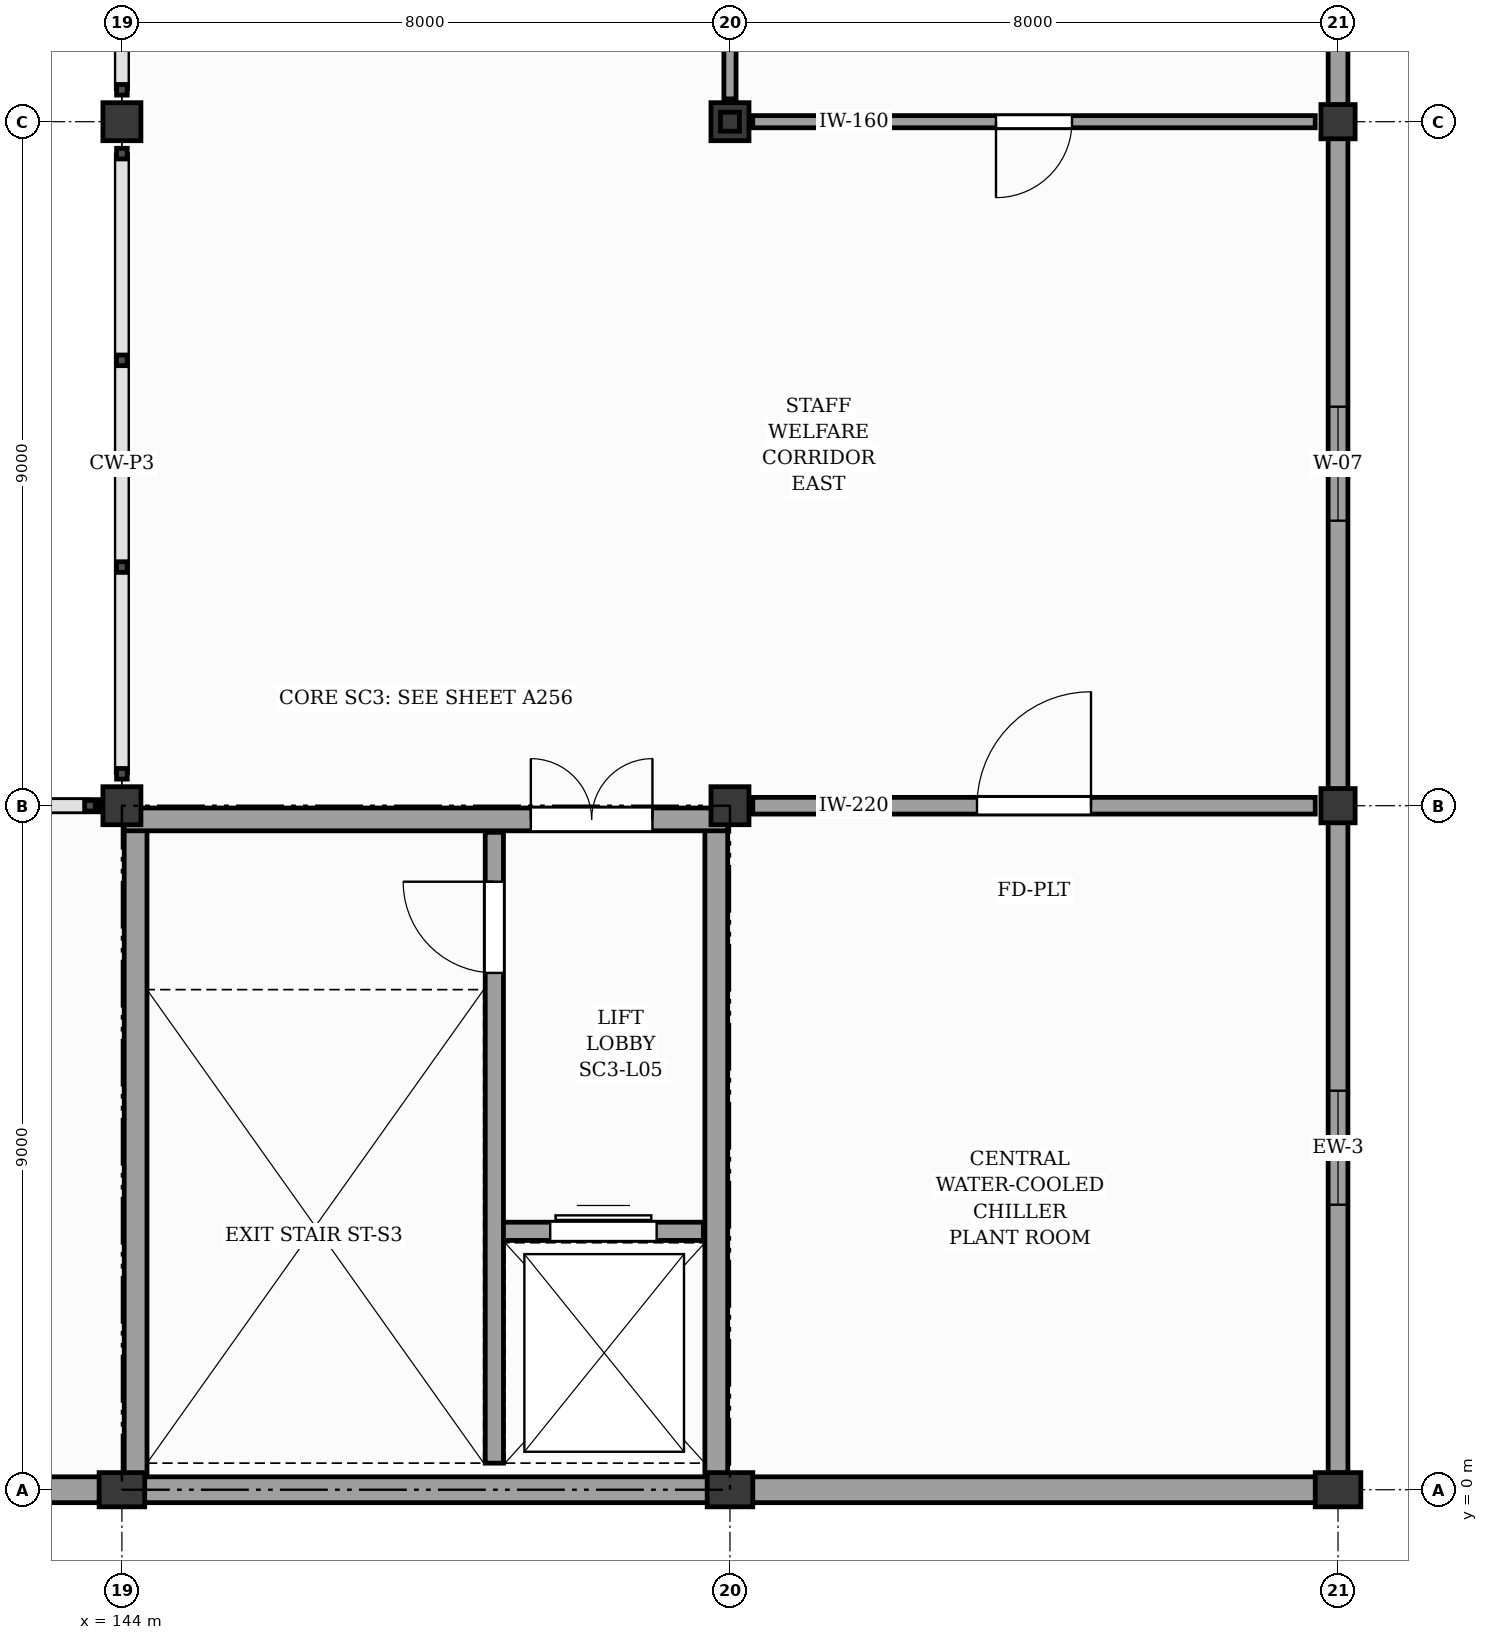
"""IFC4 building model, lengths in metres.
Left out: names, types, materials, properties, quantities, classifications, styles, units other than length and angle.
Written with IfcOpenShell. Run it as: python <this file> out.ifc"""

import sys

from ifc_helpers import new_model, si_unit, direction, frame, frame_2d, origin, origin_2d, place, context, subcontext, project, spatial, rectangle, i_section, extrude, element, fill, save


model = new_model("IFC4")
c1 = context("Model", 3, precision=1e-05, world=origin(), true_north=direction((0.0, 1.0)))
c2 = subcontext(c1, "Body", "Model", "MODEL_VIEW")
j1 = project(units=[si_unit("LENGTHUNIT", "METRE"), si_unit("PLANEANGLEUNIT", "RADIAN")], contexts=[c1])
p1 = place(None, origin())
s1 = spatial("IfcSite", under=j1, at=p1, CompositionType="ELEMENT")
p2 = place(p1, origin())
s2 = spatial("IfcBuilding", under=s1, at=p2, CompositionType="ELEMENT")
p3 = place(p2, frame((0.0, 0.0, 24.6)))
s3 = spatial("IfcBuildingStorey", under=s2, at=p3, CompositionType="ELEMENT", Elevation=24.6)
p4 = place(p3, frame((144.0, 0.0, 0.0), z_axis=(0.0, 0.0, 1.0), x_axis=(1.0, 0.0, 0.0)))
e1 = element("IfcColumn", 1, at=p4, inside=s3, PredefinedType="PILASTER", context=c2, shape_type="SweptSolid", body=[
    extrude(rectangle(XDim=0.6, YDim=0.45, at=origin_2d()), origin(), (0.0, 0.0, 1.0), 4.2),
])
for number, where, z_axis, x_axis in (
    (2, (144.0, 9.0, 0.0), (0.0, 0.0, 1.0), (1.0, 0.0, 0.0)),
    (3, (144.0, 18.0, 0.0), (0.0, 0.0, 1.0), (1.0, 0.0, 0.0)),
):
    element("IfcColumn", number, at=place(p3, frame(where, z_axis=z_axis, x_axis=x_axis)), inside=s3, PredefinedType="COLUMN", context=c2, shape_type="SweptSolid", body=[
        extrude(rectangle(XDim=0.5, YDim=0.5, at=origin_2d()), origin(), (0.0, 0.0, 1.0), 4.2),
    ])
p5 = place(p3, frame((152.0, 0.0, 0.0), z_axis=(0.0, 0.0, 1.0), x_axis=(1.0, 0.0, 0.0)))
e4 = element("IfcColumn", 4, at=p5, inside=s3, PredefinedType="PILASTER", context=c2, shape_type="SweptSolid", body=[
    extrude(rectangle(XDim=0.6, YDim=0.45, at=origin_2d()), origin(), (0.0, 0.0, 1.0), 4.2),
])
for number, where, z_axis, x_axis in (
    (5, (152.0, 9.0, 0.0), (0.0, 0.0, 1.0), (1.0, 0.0, 0.0)),
    (6, (152.0, 18.0, 0.0), (0.0, 0.0, 1.0), (1.0, 0.0, 0.0)),
):
    element("IfcColumn", number, at=place(p3, frame(where, z_axis=z_axis, x_axis=x_axis)), inside=s3, PredefinedType="COLUMN", context=c2, shape_type="SweptSolid", body=[
        extrude(rectangle(XDim=0.5, YDim=0.5, at=origin_2d()), origin(), (0.0, 0.0, 1.0), 4.2),
    ])
p6 = place(p3, frame((160.0, 0.0, 0.0), z_axis=(0.0, 0.0, 1.0), x_axis=(1.0, 0.0, 0.0)))
e7 = element("IfcColumn", 7, at=p6, inside=s3, PredefinedType="PILASTER", context=c2, shape_type="SweptSolid", body=[
    extrude(rectangle(XDim=0.6, YDim=0.45, at=origin_2d()), origin(), (0.0, 0.0, 1.0), 4.2),
])
for number, where, z_axis, x_axis in (
    (8, (160.0, 9.0, 0.0), (0.0, 0.0, 1.0), (1.0, 0.0, 0.0)),
    (9, (160.0, 18.0, 0.0), (0.0, 0.0, 1.0), (1.0, 0.0, 0.0)),
):
    element("IfcColumn", number, at=place(p3, frame(where, z_axis=z_axis, x_axis=x_axis)), inside=s3, PredefinedType="COLUMN", context=c2, shape_type="SweptSolid", body=[
        extrude(rectangle(XDim=0.45, YDim=0.45, at=origin_2d()), origin(), (0.0, 0.0, 1.0), 4.2),
    ])
p7 = place(p3, frame((152.0, 18.0, 4.2), z_axis=(0.0, 0.0, 1.0), x_axis=(1.0, 0.0, 0.0)))
e10 = element("IfcColumn", 10, at=p7, inside=s3, PredefinedType="COLUMN", context=c2, shape_type="SweptSolid", body=[
    extrude(i_section(OverallWidth=0.25, OverallDepth=0.25, WebThickness=0.009, FlangeThickness=0.01, FilletRadius=0.01, at=origin_2d()), origin(), (0.0, 0.0, 1.0), 3.25),
])
for number, where, z_axis, x_axis in (
    (11, (136.295, 0.0, 0.0), (0.0, 0.0, 1.0), (1.0, 0.0, 0.0)),
    (12, (144.295, 0.0, 0.0), (0.0, 0.0, 1.0), (1.0, 0.0, 0.0)),
    (13, (152.295, 0.0, 0.0), (0.0, 0.0, 1.0), (1.0, 0.0, 0.0)),
):
    element("IfcWall", number, at=place(p3, frame(where, z_axis=z_axis, x_axis=x_axis)), inside=s3, PredefinedType="SOLIDWALL", context=c2, shape_type="SweptSolid", body=[
        extrude(rectangle(XDim=7.41, YDim=0.34, at=frame_2d((3.705, 0.0))), origin(), (0.0, 0.0, 1.0), 3.24),
    ])
p8 = place(p3, frame((160.0, 0.22, 0.0), z_axis=(0.0, 0.0, 1.0), x_axis=(0.0, 1.0, 0.0)))
e14 = element("IfcWall", 14, at=p8, inside=s3, PredefinedType="SOLIDWALL", context=c2, shape_type="SweptSolid", body=[
    extrude(rectangle(XDim=8.56, YDim=0.26, at=frame_2d((4.28, 0.0))), origin(), (0.0, 0.0, 1.0), 3.24),
])
p9 = place(p8, frame((3.53, 0.0, 0.95)))
e15 = element("IfcOpeningElement", 15, at=p9, cuts=e14, PredefinedType="OPENING", context=c2, shape_type="SweptSolid", body=[
    extrude(rectangle(XDim=1.5, YDim=1.9, at=frame_2d((0.75, 0.95))), frame((0.0, 0.14, 0.0), z_axis=(0.0, -1.0, 0.0), x_axis=(1.0, 0.0, 0.0)), (0.0, 0.0, 1.0), 0.28),
])
p10 = place(p3, frame((160.0, 9.22, 0.0), z_axis=(0.0, 0.0, 1.0), x_axis=(0.0, 1.0, 0.0)))
e16 = element("IfcWall", 16, at=p10, inside=s3, PredefinedType="SOLIDWALL", context=c2, shape_type="SweptSolid", body=[
    extrude(rectangle(XDim=8.56, YDim=0.26, at=frame_2d((4.28, 0.0))), origin(), (0.0, 0.0, 1.0), 3.24),
])
p11 = place(p10, frame((3.53, 0.0, 0.95)))
e17 = element("IfcOpeningElement", 17, at=p11, cuts=e16, PredefinedType="OPENING", context=c2, shape_type="SweptSolid", body=[
    extrude(rectangle(XDim=1.5, YDim=1.9, at=frame_2d((0.75, 0.95))), frame((0.0, 0.14, 0.0), z_axis=(0.0, -1.0, 0.0), x_axis=(1.0, 0.0, 0.0)), (0.0, 0.0, 1.0), 0.28),
])
p12 = place(p3, frame((160.0, 18.22, 0.0), z_axis=(0.0, 0.0, 1.0), x_axis=(0.0, 1.0, 0.0)))
e18 = element("IfcWall", 18, at=p12, inside=s3, PredefinedType="SOLIDWALL", context=c2, shape_type="SweptSolid", body=[
    extrude(rectangle(XDim=8.56, YDim=0.26, at=frame_2d((4.28, 0.0))), origin(), (0.0, 0.0, 1.0), 3.24),
])
p13 = place(p12, frame((3.53, 0.0, 0.95)))
e19 = element("IfcOpeningElement", 19, at=p13, cuts=e18, PredefinedType="OPENING", context=c2, shape_type="SweptSolid", body=[
    extrude(rectangle(XDim=1.5, YDim=1.9, at=frame_2d((0.75, 0.95))), frame((0.0, 0.14, 0.0), z_axis=(0.0, -1.0, 0.0), x_axis=(1.0, 0.0, 0.0)), (0.0, 0.0, 1.0), 0.28),
])
p14 = place(p3, frame((148.9, 0.35, 0.0), z_axis=(0.0, 0.0, 1.0), x_axis=(0.0, 1.0, 0.0)))
e20 = element("IfcWall", 20, at=p14, inside=s3, PredefinedType="SHEAR", context=c2, shape_type="SweptSolid", body=[
    extrude(rectangle(XDim=8.3, YDim=0.24, at=frame_2d((4.15, 0.0))), origin(), (0.0, 0.0, 1.0), 3.98),
])
p15 = place(p14, frame((6.45, 0.0, 0.0)))
e21 = element("IfcOpeningElement", 21, at=p15, cuts=e20, PredefinedType="OPENING", context=c2, shape_type="SweptSolid", body=[
    extrude(rectangle(XDim=1.2, YDim=2.15, at=frame_2d((0.6, 1.075))), frame((0.0, 0.13, 0.0), z_axis=(0.0, -1.0, 0.0), x_axis=(1.0, 0.0, 0.0)), (0.0, 0.0, 1.0), 0.26),
])
p16 = place(p3, frame((149.02, 3.4, 0.0), z_axis=(0.0, 0.0, 1.0), x_axis=(1.0, 0.0, 0.0)))
e22 = element("IfcWall", 22, at=p16, inside=s3, PredefinedType="SHEAR", context=c2, shape_type="SweptSolid", body=[
    extrude(rectangle(XDim=2.63, YDim=0.24, at=frame_2d((1.315, 0.0))), origin(), (0.0, 0.0, 1.0), 3.98),
])
p17 = place(p16, frame((0.615, 0.0, 0.0)))
e23 = element("IfcOpeningElement", 23, at=p17, cuts=e22, PredefinedType="OPENING", context=c2, shape_type="SweptSolid", body=[
    extrude(rectangle(XDim=1.4, YDim=2.15, at=frame_2d((0.7, 1.075))), frame((0.0, 0.13, 0.0), z_axis=(0.0, -1.0, 0.0), x_axis=(1.0, 0.0, 0.0)), (0.0, 0.0, 1.0), 0.26),
])
for number, where, z_axis, x_axis in (
    (24, (144.18, 0.18, 0.0), (0.0, 0.0, 1.0), (0.0, 1.0, 0.0)),
    (25, (151.82, 0.18, 0.0), (0.0, 0.0, 1.0), (0.0, 1.0, 0.0)),
):
    element("IfcWall", number, at=place(p3, frame(where, z_axis=z_axis, x_axis=x_axis)), inside=s3, PredefinedType="SHEAR", context=c2, shape_type="SweptSolid", body=[
        extrude(rectangle(XDim=8.64, YDim=0.3, at=frame_2d((4.32, 0.0))), origin(), (0.0, 0.0, 1.0), 3.98),
    ])
p18 = place(p3, frame((144.03, 8.82, 0.0), z_axis=(0.0, 0.0, 1.0), x_axis=(1.0, 0.0, 0.0)))
e26 = element("IfcWall", 26, at=p18, inside=s3, PredefinedType="SHEAR", context=c2, shape_type="SweptSolid", body=[
    extrude(rectangle(XDim=7.94, YDim=0.3, at=frame_2d((3.97, 0.0))), origin(), (0.0, 0.0, 1.0), 3.98),
])
p19 = place(p18, frame((5.35, 0.0, 0.0)))
e27 = element("IfcOpeningElement", 27, at=p19, cuts=e26, PredefinedType="OPENING", context=c2, shape_type="SweptSolid", body=[
    extrude(rectangle(XDim=1.6, YDim=2.15, at=frame_2d((0.8, 1.075))), frame((0.0, 0.16, 0.0), z_axis=(0.0, -1.0, 0.0), x_axis=(1.0, 0.0, 0.0)), (0.0, 0.0, 1.0), 0.32),
])
p20 = place(p3, frame((136.3, 9.0, 0.0), z_axis=(0.0, 0.0, 1.0), x_axis=(1.0, 0.0, 0.0)))
e28 = element("IfcWall", 28, at=p20, inside=s3, PredefinedType="PARTITIONING", context=c2, shape_type="SweptSolid", body=[
    extrude(rectangle(XDim=7.4, YDim=0.16, at=frame_2d((3.7, 0.0))), origin(), (0.0, 0.0, 1.0), 3.1),
])
p21 = place(p3, frame((152.3, 18.0, 0.0), z_axis=(0.0, 0.0, 1.0), x_axis=(1.0, 0.0, 0.0)))
e29 = element("IfcWall", 29, at=p21, inside=s3, PredefinedType="PARTITIONING", context=c2, shape_type="SweptSolid", body=[
    extrude(rectangle(XDim=7.4, YDim=0.16, at=frame_2d((3.7, 0.0))), origin(), (0.0, 0.0, 1.0), 3.1),
])
p22 = place(p21, frame((3.2, 0.0, 0.0)))
e30 = element("IfcOpeningElement", 30, at=p22, cuts=e29, PredefinedType="OPENING", context=c2, shape_type="SweptSolid", body=[
    extrude(rectangle(XDim=1.0, YDim=2.1, at=frame_2d((0.5, 1.05))), frame((0.0, 0.09, 0.0), z_axis=(0.0, -1.0, 0.0), x_axis=(1.0, 0.0, 0.0)), (0.0, 0.0, 1.0), 0.18),
])
p23 = place(p3, frame((152.0, 18.3, 0.0), z_axis=(0.0, 0.0, 1.0), x_axis=(0.0, 1.0, 0.0)))
e31 = element("IfcWall", 31, at=p23, inside=s3, PredefinedType="PARTITIONING", context=c2, shape_type="SweptSolid", body=[
    extrude(rectangle(XDim=8.4, YDim=0.16, at=frame_2d((4.2, 0.0))), origin(), (0.0, 0.0, 1.0), 3.1),
])
p24 = place(p3, frame((152.3, 9.0, 0.0), z_axis=(0.0, 0.0, 1.0), x_axis=(1.0, 0.0, 0.0)))
e32 = element("IfcWall", 32, at=p24, inside=s3, PredefinedType="SOLIDWALL", context=c2, shape_type="SweptSolid", body=[
    extrude(rectangle(XDim=7.4, YDim=0.22, at=frame_2d((3.7, 0.0))), origin(), (0.0, 0.0, 1.0), 3.1),
])
p25 = place(p24, frame((2.95, 0.0, 0.0)))
e33 = element("IfcOpeningElement", 33, at=p25, cuts=e32, PredefinedType="OPENING", context=c2, shape_type="SweptSolid", body=[
    extrude(rectangle(XDim=1.5, YDim=2.2, at=frame_2d((0.75, 1.1))), frame((0.0, 0.12, 0.0), z_axis=(0.0, -1.0, 0.0), x_axis=(1.0, 0.0, 0.0)), (0.0, 0.0, 1.0), 0.24),
])
p26 = place(p9, origin())
e34 = element("IfcWindow", 34, at=p26, inside=s3, PartitioningType="SINGLE_PANEL", PredefinedType="WINDOW", context=c2, shape_type="SweptSolid", body=[
    extrude(rectangle(XDim=1.5, YDim=1.9, at=frame_2d((0.75, 0.95))), frame((0.0, 0.03, 0.0), z_axis=(0.0, -1.0, 0.0), x_axis=(1.0, 0.0, 0.0)), (0.0, 0.0, 1.0), 0.06),
])
fill(e15, e34)
p27 = place(p11, origin())
e35 = element("IfcWindow", 35, at=p27, inside=s3, PartitioningType="SINGLE_PANEL", PredefinedType="WINDOW", context=c2, shape_type="SweptSolid", body=[
    extrude(rectangle(XDim=1.5, YDim=1.9, at=frame_2d((0.75, 0.95))), frame((0.0, 0.03, 0.0), z_axis=(0.0, -1.0, 0.0), x_axis=(1.0, 0.0, 0.0)), (0.0, 0.0, 1.0), 0.06),
])
fill(e17, e35)
p28 = place(p15, origin())
e36 = element("IfcDoor", 36, at=p28, inside=s3, OperationType="SINGLE_SWING_RIGHT", PredefinedType="DOOR", context=c2, shape_type="SweptSolid", body=[
    extrude(rectangle(XDim=1.2, YDim=2.15, at=frame_2d((0.6, 1.075))), frame((0.0, 0.025, 0.0), z_axis=(0.0, -1.0, 0.0), x_axis=(1.0, 0.0, 0.0)), (0.0, 0.0, 1.0), 0.05),
])
fill(e21, e36)
p29 = place(p17, origin())
e37 = element("IfcDoor", 37, at=p29, inside=s3, OperationType="DOUBLE_DOOR_SLIDING", PredefinedType="DOOR", context=c2, shape_type="SweptSolid", body=[
    extrude(rectangle(XDim=1.4, YDim=2.15, at=frame_2d((0.7, 1.075))), frame((0.0, 0.025, 0.0), z_axis=(0.0, -1.0, 0.0), x_axis=(1.0, 0.0, 0.0)), (0.0, 0.0, 1.0), 0.05),
])
fill(e23, e37)
p30 = place(p19, origin())
e38 = element("IfcDoor", 38, at=p30, inside=s3, OperationType="DOUBLE_DOOR_SINGLE_SWING", PredefinedType="DOOR", context=c2, shape_type="SweptSolid", body=[
    extrude(rectangle(XDim=1.6, YDim=2.15, at=frame_2d((0.8, 1.075))), frame((0.0, 0.025, 0.0), z_axis=(0.0, -1.0, 0.0), x_axis=(1.0, 0.0, 0.0)), (0.0, 0.0, 1.0), 0.05),
])
fill(e27, e38)
p31 = place(p22, frame((1.0, 0.0, 0.0), z_axis=(0.0, 0.0, 1.0), x_axis=(-1.0, 0.0, 0.0)))
e39 = element("IfcDoor", 39, at=p31, inside=s3, OperationType="SINGLE_SWING_LEFT", PredefinedType="DOOR", context=c2, shape_type="SweptSolid", body=[
    extrude(rectangle(XDim=1.0, YDim=2.1, at=frame_2d((0.5, 1.05))), frame((0.0, 0.025, 0.0), z_axis=(0.0, -1.0, 0.0), x_axis=(1.0, 0.0, 0.0)), (0.0, 0.0, 1.0), 0.05),
])
fill(e30, e39)
p32 = place(p25, origin())
e40 = element("IfcDoor", 40, at=p32, inside=s3, OperationType="SINGLE_SWING_RIGHT", PredefinedType="DOOR", context=c2, shape_type="SweptSolid", body=[
    extrude(rectangle(XDim=1.5, YDim=2.2, at=frame_2d((0.75, 1.1))), frame((0.0, 0.025, 0.0), z_axis=(0.0, -1.0, 0.0), x_axis=(1.0, 0.0, 0.0)), (0.0, 0.0, 1.0), 0.05),
])
fill(e33, e40)
save(model, sys.argv[1])
